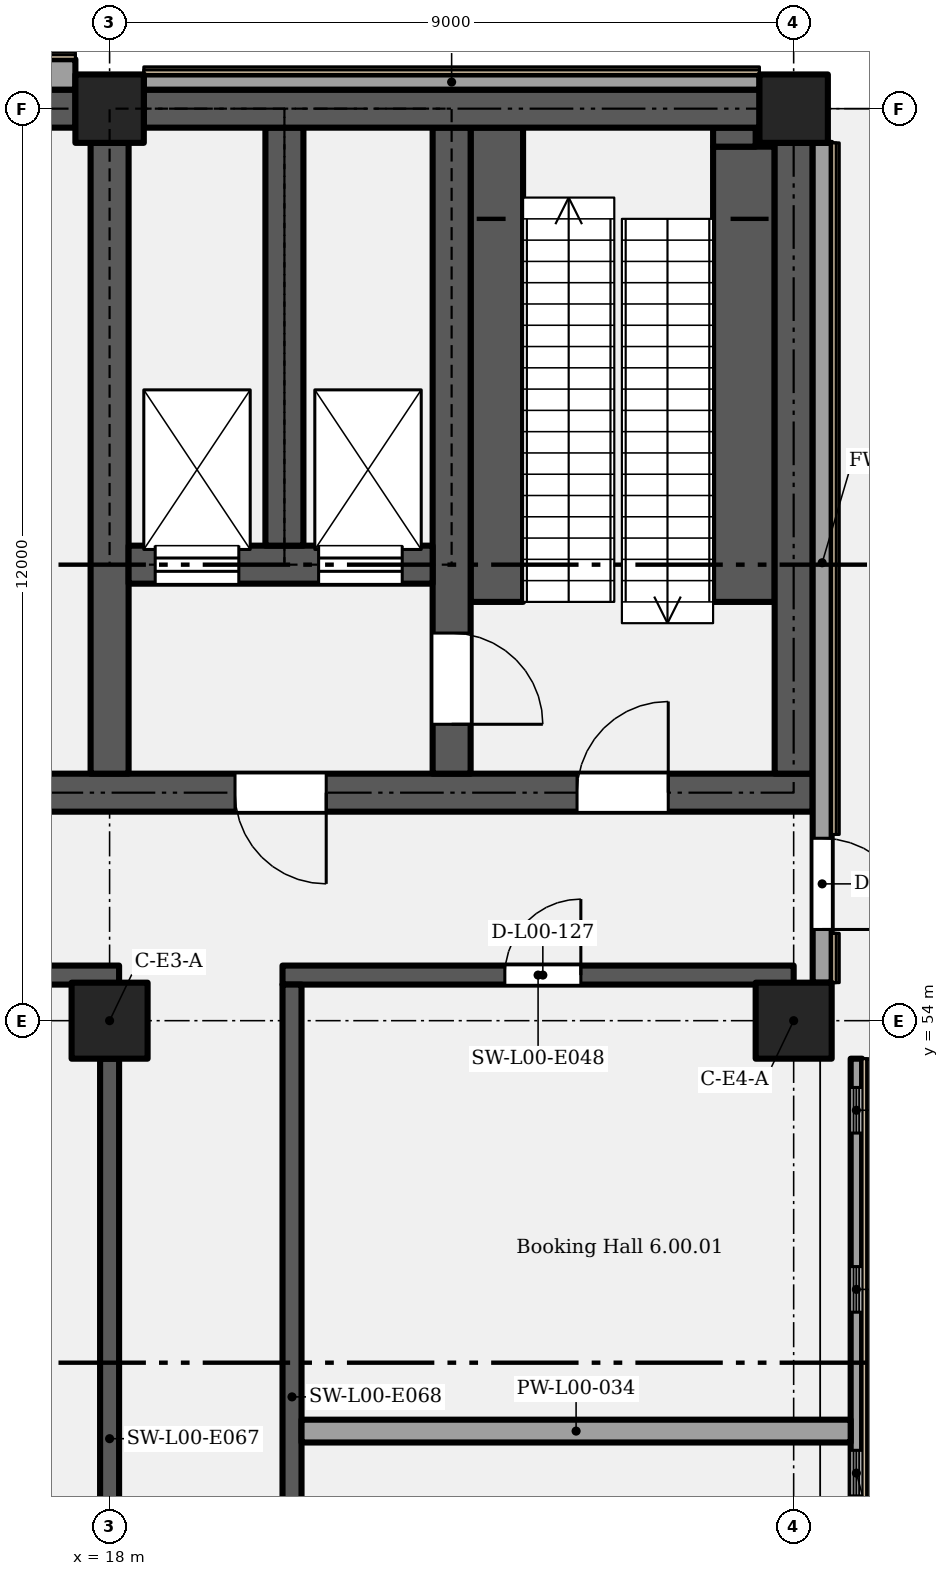
"""IFC4 building model, lengths in metres.
Left out: names, types, materials, properties, quantities, classifications, styles, units other than length and angle.
Written with IfcOpenShell. Run it as: python <this file> out.ifc"""

import sys

from ifc_helpers import new_model, si_unit, direction, frame, frame_2d, origin, origin_2d, place, context, subcontext, project, spatial, rectangle, extrude, element, fill, save


model = new_model("IFC4")
c1 = context("Model", 3, precision=1e-05, world=origin(), true_north=direction((0.0, 1.0)))
c2 = subcontext(c1, "Body", "Model", "MODEL_VIEW")
j1 = project(units=[si_unit("LENGTHUNIT", "METRE"), si_unit("PLANEANGLEUNIT", "RADIAN")], contexts=[c1])
p1 = place(None, origin())
s1 = spatial("IfcSite", under=j1, at=p1, CompositionType="ELEMENT")
p2 = place(p1, origin())
s2 = spatial("IfcBuilding", under=s1, at=p2, CompositionType="ELEMENT")
p3 = place(p2, origin())
s3 = spatial("IfcBuildingStorey", under=s2, at=p3, CompositionType="ELEMENT", Elevation=0.0)
for number, where, z_axis, x_axis in (
    (1, (18.0, 54.0, 0.0), (0.0, 0.0, 1.0), (1.0, 0.0, 0.0)),
    (2, (27.0, 54.0, 0.0), (0.0, 0.0, 1.0), (1.0, 0.0, 0.0)),
):
    element("IfcColumn", number, at=place(p3, frame(where, z_axis=z_axis, x_axis=x_axis)), inside=s3, PredefinedType="COLUMN", context=c2, shape_type="SweptSolid", body=[
        extrude(rectangle(XDim=1.0, YDim=1.0, at=origin_2d()), origin(), (0.0, 0.0, 1.0), 6.6),
    ])
for number, where, z_axis, x_axis in (
    (3, (18.0, 66.0, 0.0), (0.0, 0.0, 1.0), (1.0, 0.0, 0.0)),
    (4, (27.0, 66.0, 0.0), (0.0, 0.0, 1.0), (1.0, 0.0, 0.0)),
):
    element("IfcColumn", number, at=place(p3, frame(where, z_axis=z_axis, x_axis=x_axis)), inside=s3, PredefinedType="COLUMN", context=c2, shape_type="SweptSolid", body=[
        extrude(rectangle(XDim=0.9, YDim=0.9, at=origin_2d()), origin(), (0.0, 0.0, 1.0), 6.6),
    ])
p4 = place(p3, frame((-0.25, 57.0, 0.0), z_axis=(0.0, 0.0, 1.0), x_axis=(1.0, 0.0, 0.0)))
e5 = element("IfcWall", 5, at=p4, inside=s3, PredefinedType="SHEAR", context=c2, shape_type="SweptSolid", body=[
    extrude(rectangle(XDim=27.5, YDim=0.5, at=frame_2d((13.75, 0.0))), origin(), (0.0, 0.0, 1.0), 6.3),
])
p5 = place(p4, frame((1.9, 0.0, 0.0)))
e6 = element("IfcOpeningElement", 6, at=p5, cuts=e5, PredefinedType="OPENING", context=c2, shape_type="SweptSolid", body=[
    extrude(rectangle(XDim=1.2, YDim=2.1, at=frame_2d((0.6, 1.05))), frame((0.0, 0.26, 0.0), z_axis=(0.0, -1.0, 0.0), x_axis=(1.0, 0.0, 0.0)), (0.0, 0.0, 1.0), 0.52),
])
p6 = place(p4, frame((7.6, 0.0, 0.0), z_axis=(0.0, 0.0, 1.0), x_axis=(-1.0, 0.0, 0.0)))
e7 = element("IfcOpeningElement", 7, at=p6, cuts=e5, PredefinedType="OPENING", context=c2, shape_type="SweptSolid", body=[
    extrude(rectangle(XDim=1.2, YDim=2.1, at=frame_2d((0.6, 1.05))), frame((0.0, 0.26, 0.0), z_axis=(0.0, -1.0, 0.0), x_axis=(1.0, 0.0, 0.0)), (0.0, 0.0, 1.0), 0.52),
])
p7 = place(p4, frame((21.1, 0.0, 0.0), z_axis=(0.0, 0.0, 1.0), x_axis=(-1.0, 0.0, 0.0)))
e8 = element("IfcOpeningElement", 8, at=p7, cuts=e5, PredefinedType="OPENING", context=c2, shape_type="SweptSolid", body=[
    extrude(rectangle(XDim=1.2, YDim=2.1, at=frame_2d((0.6, 1.05))), frame((0.0, 0.26, 0.0), z_axis=(0.0, -1.0, 0.0), x_axis=(1.0, 0.0, 0.0)), (0.0, 0.0, 1.0), 0.52),
])
p8 = place(p4, frame((24.4, 0.0, 0.0)))
e9 = element("IfcOpeningElement", 9, at=p8, cuts=e5, PredefinedType="OPENING", context=c2, shape_type="SweptSolid", body=[
    extrude(rectangle(XDim=1.2, YDim=2.1, at=frame_2d((0.6, 1.05))), frame((0.0, 0.26, 0.0), z_axis=(0.0, -1.0, 0.0), x_axis=(1.0, 0.0, 0.0)), (0.0, 0.0, 1.0), 0.52),
])
p9 = place(p3, frame((18.0, 57.25, 0.0), z_axis=(0.0, 0.0, 1.0), x_axis=(0.0, 1.0, 0.0)))
e10 = element("IfcWall", 10, at=p9, inside=s3, PredefinedType="SHEAR", context=c2, shape_type="SweptSolid", body=[
    extrude(rectangle(XDim=8.3, YDim=0.5, at=frame_2d((4.15, 0.0))), origin(), (0.0, 0.0, 1.0), 6.3),
])
p10 = place(p3, frame((22.5, 57.25, 0.0), z_axis=(0.0, 0.0, 1.0), x_axis=(0.0, 1.0, 0.0)))
e11 = element("IfcWall", 11, at=p10, inside=s3, PredefinedType="SHEAR", context=c2, shape_type="SweptSolid", body=[
    extrude(rectangle(XDim=8.5, YDim=0.5, at=frame_2d((4.25, 0.0))), origin(), (0.0, 0.0, 1.0), 6.3),
])
p11 = place(p10, frame((1.85, 0.0, 0.0), z_axis=(0.0, 0.0, 1.0), x_axis=(-1.0, 0.0, 0.0)))
e12 = element("IfcOpeningElement", 12, at=p11, cuts=e11, PredefinedType="OPENING", context=c2, shape_type="SweptSolid", body=[
    extrude(rectangle(XDim=1.2, YDim=2.1, at=frame_2d((0.6, 1.05))), frame((0.0, 0.26, 0.0), z_axis=(0.0, -1.0, 0.0), x_axis=(1.0, 0.0, 0.0)), (0.0, 0.0, 1.0), 0.52),
])
p12 = place(p3, frame((27.0, 57.25, 0.0), z_axis=(0.0, 0.0, 1.0), x_axis=(0.0, 1.0, 0.0)))
e13 = element("IfcWall", 13, at=p12, inside=s3, PredefinedType="SHEAR", context=c2, shape_type="SweptSolid", body=[
    extrude(rectangle(XDim=8.3, YDim=0.5, at=frame_2d((4.15, 0.0))), origin(), (0.0, 0.0, 1.0), 6.3),
])
p13 = place(p3, frame((18.25, 60.0, 0.0), z_axis=(0.0, 0.0, 1.0), x_axis=(1.0, 0.0, 0.0)))
e14 = element("IfcWall", 14, at=p13, inside=s3, PredefinedType="SHEAR", context=c2, shape_type="SweptSolid", body=[
    extrude(rectangle(XDim=4.0, YDim=0.5, at=frame_2d((2.0, 0.0))), origin(), (0.0, 0.0, 1.0), 6.3),
])
p14 = place(p13, frame((0.35, 0.0, 0.0)))
e15 = element("IfcOpeningElement", 15, at=p14, cuts=e14, PredefinedType="OPENING", context=c2, shape_type="SweptSolid", body=[
    extrude(rectangle(XDim=1.1, YDim=2.1, at=frame_2d((0.55, 1.05))), frame((0.0, 0.26, 0.0), z_axis=(0.0, -1.0, 0.0), x_axis=(1.0, 0.0, 0.0)), (0.0, 0.0, 1.0), 0.52),
])
p15 = place(p13, frame((2.5, 0.0, 0.0)))
e16 = element("IfcOpeningElement", 16, at=p15, cuts=e14, PredefinedType="OPENING", context=c2, shape_type="SweptSolid", body=[
    extrude(rectangle(XDim=1.1, YDim=2.1, at=frame_2d((0.55, 1.05))), frame((0.0, 0.26, 0.0), z_axis=(0.0, -1.0, 0.0), x_axis=(1.0, 0.0, 0.0)), (0.0, 0.0, 1.0), 0.52),
])
p16 = place(p3, frame((20.3, 60.25, 0.0), z_axis=(0.0, 0.0, 1.0), x_axis=(0.0, 1.0, 0.0)))
e17 = element("IfcWall", 17, at=p16, inside=s3, PredefinedType="SHEAR", context=c2, shape_type="SweptSolid", body=[
    extrude(rectangle(XDim=5.5, YDim=0.5, at=frame_2d((2.75, 0.0))), origin(), (0.0, 0.0, 1.0), 6.3),
])
p17 = place(p3, frame((9.45, 66.0, 0.0), z_axis=(0.0, 0.0, 1.0), x_axis=(1.0, 0.0, 0.0)))
e18 = element("IfcWall", 18, at=p17, inside=s3, PredefinedType="SHEAR", context=c2, shape_type="SweptSolid", body=[
    extrude(rectangle(XDim=8.1, YDim=0.5, at=frame_2d((4.05, 0.0))), origin(), (0.0, 0.0, 1.0), 6.3),
])
p18 = place(p17, frame((3.35, 0.0, 0.0)))
e19 = element("IfcOpeningElement", 19, at=p18, cuts=e18, PredefinedType="OPENING", context=c2, shape_type="SweptSolid", body=[
    extrude(rectangle(XDim=1.4, YDim=2.1, at=frame_2d((0.7, 1.05))), frame((0.0, 0.26, 0.0), z_axis=(0.0, -1.0, 0.0), x_axis=(1.0, 0.0, 0.0)), (0.0, 0.0, 1.0), 0.52),
])
p19 = place(p3, frame((18.45, 66.0, 0.0), z_axis=(0.0, 0.0, 1.0), x_axis=(1.0, 0.0, 0.0)))
e20 = element("IfcWall", 20, at=p19, inside=s3, PredefinedType="SHEAR", context=c2, shape_type="SweptSolid", body=[
    extrude(rectangle(XDim=8.1, YDim=0.5, at=frame_2d((4.05, 0.0))), origin(), (0.0, 0.0, 1.0), 6.3),
])
p20 = place(p3, frame((14.2, 66.45, 0.0), z_axis=(0.0, 0.0, 1.0), x_axis=(1.0, 0.0, 0.0)))
e21 = element("IfcWall", 21, at=p20, inside=s3, PredefinedType="SOLIDWALL", context=c2, shape_type="SweptSolid", body=[
    extrude(rectangle(XDim=3.35, YDim=0.4, at=frame_2d((1.675, 0.0))), origin(), (0.0, 0.0, 1.0), 6.3),
])
p21 = place(p3, frame((18.45, 66.35, 0.0), z_axis=(0.0, 0.0, 1.0), x_axis=(1.0, 0.0, 0.0)))
e22 = element("IfcWall", 22, at=p21, inside=s3, PredefinedType="SOLIDWALL", context=c2, shape_type="SweptSolid", body=[
    extrude(rectangle(XDim=8.1, YDim=0.2, at=frame_2d((4.05, 0.0))), origin(), (0.0, 0.0, 1.0), 6.3),
])
p22 = place(p3, frame((27.825, 38.0, 0.0), z_axis=(0.0, 0.0, 1.0), x_axis=(0.0, 1.0, 0.0)))
e23 = element("IfcWall", 23, at=p22, inside=s3, PredefinedType="SOLIDWALL", context=c2, shape_type="SweptSolid", body=[
    extrude(rectangle(XDim=15.5, YDim=0.15, at=frame_2d((7.75, 0.0))), origin(), (0.0, 0.0, 1.0), 6.4),
])
p23 = place(p22, frame((0.379, 0.0, 1.5)))
e24 = element("IfcOpeningElement", 24, at=p23, cuts=e23, PredefinedType="OPENING", context=c2, shape_type="SweptSolid", body=[
    extrude(rectangle(XDim=0.6, YDim=3.0, at=frame_2d((0.3, 1.5))), frame((0.0, 0.085, 0.0), z_axis=(0.0, -1.0, 0.0), x_axis=(1.0, 0.0, 0.0)), (0.0, 0.0, 1.0), 0.17),
])
p24 = place(p22, frame((2.736, 0.0, 1.5)))
e25 = element("IfcOpeningElement", 25, at=p24, cuts=e23, PredefinedType="OPENING", context=c2, shape_type="SweptSolid", body=[
    extrude(rectangle(XDim=0.6, YDim=3.0, at=frame_2d((0.3, 1.5))), frame((0.0, 0.085, 0.0), z_axis=(0.0, -1.0, 0.0), x_axis=(1.0, 0.0, 0.0)), (0.0, 0.0, 1.0), 0.17),
])
p25 = place(p22, frame((7.45, 0.0, 1.5)))
e26 = element("IfcOpeningElement", 26, at=p25, cuts=e23, PredefinedType="OPENING", context=c2, shape_type="SweptSolid", body=[
    extrude(rectangle(XDim=0.6, YDim=3.0, at=frame_2d((0.3, 1.5))), frame((0.0, 0.085, 0.0), z_axis=(0.0, -1.0, 0.0), x_axis=(1.0, 0.0, 0.0)), (0.0, 0.0, 1.0), 0.17),
])
p26 = place(p22, frame((9.747, 0.0, 1.5)))
e27 = element("IfcOpeningElement", 27, at=p26, cuts=e23, PredefinedType="OPENING", context=c2, shape_type="SweptSolid", body=[
    extrude(rectangle(XDim=0.6, YDim=3.0, at=frame_2d((0.3, 1.5))), frame((0.0, 0.085, 0.0), z_axis=(0.0, -1.0, 0.0), x_axis=(1.0, 0.0, 0.0)), (0.0, 0.0, 1.0), 0.17),
])
p27 = place(p22, frame((12.164, 0.0, 1.5)))
e28 = element("IfcOpeningElement", 28, at=p27, cuts=e23, PredefinedType="OPENING", context=c2, shape_type="SweptSolid", body=[
    extrude(rectangle(XDim=0.6, YDim=3.0, at=frame_2d((0.3, 1.5))), frame((0.0, 0.085, 0.0), z_axis=(0.0, -1.0, 0.0), x_axis=(1.0, 0.0, 0.0)), (0.0, 0.0, 1.0), 0.17),
])
p28 = place(p22, frame((14.521, 0.0, 1.5)))
e29 = element("IfcOpeningElement", 29, at=p28, cuts=e23, PredefinedType="OPENING", context=c2, shape_type="SweptSolid", body=[
    extrude(rectangle(XDim=0.6, YDim=3.0, at=frame_2d((0.3, 1.5))), frame((0.0, 0.085, 0.0), z_axis=(0.0, -1.0, 0.0), x_axis=(1.0, 0.0, 0.0)), (0.0, 0.0, 1.0), 0.17),
])
p29 = place(p3, frame((27.375, 54.5, 0.0), z_axis=(0.0, 0.0, 1.0), x_axis=(0.0, 1.0, 0.0)))
e30 = element("IfcWall", 30, at=p29, inside=s3, PredefinedType="SOLIDWALL", context=c2, shape_type="SweptSolid", body=[
    extrude(rectangle(XDim=11.05, YDim=0.25, at=frame_2d((5.525, 0.0))), origin(), (0.0, 0.0, 1.0), 6.3),
])
p30 = place(p29, frame((1.9, 0.0, 0.0), z_axis=(0.0, 0.0, 1.0), x_axis=(-1.0, 0.0, 0.0)))
e31 = element("IfcOpeningElement", 31, at=p30, cuts=e30, PredefinedType="OPENING", context=c2, shape_type="SweptSolid", body=[
    extrude(rectangle(XDim=1.2, YDim=2.1, at=frame_2d((0.6, 1.05))), frame((0.0, 0.135, 0.0), z_axis=(0.0, -1.0, 0.0), x_axis=(1.0, 0.0, 0.0)), (0.0, 0.0, 1.0), 0.27),
])
p31 = place(p3, frame((20.525, 48.6, 0.0), z_axis=(0.0, 0.0, 1.0), x_axis=(1.0, 0.0, 0.0)))
e32 = element("IfcWall", 32, at=p31, inside=s3, PredefinedType="PARTITIONING", context=c2, shape_type="SweptSolid", body=[
    extrude(rectangle(XDim=7.225, YDim=0.3, at=frame_2d((3.613, 0.0))), origin(), (0.0, 0.0, 1.0), 6.3),
])
p32 = place(p3, frame((9.0, 54.6, 0.0), z_axis=(0.0, 0.0, 1.0), x_axis=(1.0, 0.0, 0.0)))
e33 = element("IfcWall", 33, at=p32, inside=s3, PredefinedType="SHEAR", context=c2, shape_type="SweptSolid", body=[
    extrude(rectangle(XDim=9.125, YDim=0.25, at=frame_2d((4.562, 0.0))), origin(), (0.0, 0.0, 1.0), 6.3),
])
p33 = place(p32, frame((3.9, 0.0, 0.0)))
e34 = element("IfcOpeningElement", 34, at=p33, cuts=e33, PredefinedType="OPENING", context=c2, shape_type="SweptSolid", body=[
    extrude(rectangle(XDim=1.2, YDim=2.1, at=frame_2d((0.6, 1.05))), frame((0.0, 0.135, 0.0), z_axis=(0.0, -1.0, 0.0), x_axis=(1.0, 0.0, 0.0)), (0.0, 0.0, 1.0), 0.27),
])
p34 = place(p3, frame((20.275, 54.6, 0.0), z_axis=(0.0, 0.0, 1.0), x_axis=(1.0, 0.0, 0.0)))
e35 = element("IfcWall", 35, at=p34, inside=s3, PredefinedType="SHEAR", context=c2, shape_type="SweptSolid", body=[
    extrude(rectangle(XDim=6.725, YDim=0.25, at=frame_2d((3.363, 0.0))), origin(), (0.0, 0.0, 1.0), 6.3),
])
p35 = place(p34, frame((2.925, 0.0, 0.0)))
e36 = element("IfcOpeningElement", 36, at=p35, cuts=e35, PredefinedType="OPENING", context=c2, shape_type="SweptSolid", body=[
    extrude(rectangle(XDim=1.0, YDim=2.1, at=frame_2d((0.5, 1.05))), frame((0.0, 0.135, 0.0), z_axis=(0.0, -1.0, 0.0), x_axis=(1.0, 0.0, 0.0)), (0.0, 0.0, 1.0), 0.27),
])
p36 = place(p3, frame((18.0, 43.5, 0.0), z_axis=(0.0, 0.0, 1.0), x_axis=(0.0, 1.0, 0.0)))
e37 = element("IfcWall", 37, at=p36, inside=s3, PredefinedType="SHEAR", context=c2, shape_type="SweptSolid", body=[
    extrude(rectangle(XDim=10.0, YDim=0.25, at=frame_2d((5.0, 0.0))), origin(), (0.0, 0.0, 1.0), 6.3),
])
p37 = place(p3, frame((20.4, 43.625, 0.0), z_axis=(0.0, 0.0, 1.0), x_axis=(0.0, 1.0, 0.0)))
e38 = element("IfcWall", 38, at=p37, inside=s3, PredefinedType="SHEAR", context=c2, shape_type="SweptSolid", body=[
    extrude(rectangle(XDim=10.85, YDim=0.25, at=frame_2d((5.425, 0.0))), origin(), (0.0, 0.0, 1.0), 6.3),
])
p38 = place(p37, frame((1.375, 0.0, 0.0)))
e39 = element("IfcOpeningElement", 39, at=p38, cuts=e38, PredefinedType="OPENING", context=c2, shape_type="SweptSolid", body=[
    extrude(rectangle(XDim=1.0, YDim=2.1, at=frame_2d((0.5, 1.05))), frame((0.0, 0.135, 0.0), z_axis=(0.0, -1.0, 0.0), x_axis=(1.0, 0.0, 0.0)), (0.0, 0.0, 1.0), 0.27),
])
p39 = place(p3, frame((23.095, 59.51, 0.0), z_axis=(0.0, 0.0, 1.0), x_axis=(0.0, 1.0, 0.0)))
e40 = element("IfcWall", 40, at=p39, inside=s3, PredefinedType="SHEAR", context=c2, shape_type="SweptSolid", body=[
    extrude(rectangle(XDim=6.24, YDim=0.69, at=frame_2d((3.12, 0.0))), origin(), (0.0, 0.0, 1.0), 3.1),
])
p40 = place(p3, frame((26.345, 59.51, 0.0), z_axis=(0.0, 0.0, 1.0), x_axis=(0.0, 1.0, 0.0)))
e41 = element("IfcWall", 41, at=p40, inside=s3, PredefinedType="SHEAR", context=c2, shape_type="SweptSolid", body=[
    extrude(rectangle(XDim=5.99, YDim=0.81, at=frame_2d((2.995, 0.0))), origin(), (0.0, 0.0, 1.0), 3.1),
])
p41 = place(p3, frame((26.22, 65.5, 0.0), z_axis=(0.0, 0.0, 1.0), x_axis=(0.0, 1.0, 0.0)))
e42 = element("IfcWall", 42, at=p41, inside=s3, PredefinedType="SHEAR", context=c2, shape_type="SweptSolid", body=[
    extrude(rectangle(XDim=0.25, YDim=0.56, at=frame_2d((0.125, 0.0))), origin(), (0.0, 0.0, 1.0), 3.1),
])
p42 = place(p26, origin())
e43 = element("IfcWindow", 43, at=p42, inside=s3, PartitioningType="SINGLE_PANEL", PredefinedType="WINDOW", context=c2, shape_type="SweptSolid", body=[
    extrude(rectangle(XDim=0.6, YDim=3.0, at=frame_2d((0.3, 1.5))), frame((0.0, 0.03, 0.0), z_axis=(0.0, -1.0, 0.0), x_axis=(1.0, 0.0, 0.0)), (0.0, 0.0, 1.0), 0.06),
])
fill(e27, e43)
p43 = place(p27, origin())
e44 = element("IfcWindow", 44, at=p43, inside=s3, PartitioningType="SINGLE_PANEL", PredefinedType="WINDOW", context=c2, shape_type="SweptSolid", body=[
    extrude(rectangle(XDim=0.6, YDim=3.0, at=frame_2d((0.3, 1.5))), frame((0.0, 0.03, 0.0), z_axis=(0.0, -1.0, 0.0), x_axis=(1.0, 0.0, 0.0)), (0.0, 0.0, 1.0), 0.06),
])
fill(e28, e44)
p44 = place(p28, origin())
e45 = element("IfcWindow", 45, at=p44, inside=s3, PartitioningType="SINGLE_PANEL", PredefinedType="WINDOW", context=c2, shape_type="SweptSolid", body=[
    extrude(rectangle(XDim=0.6, YDim=3.0, at=frame_2d((0.3, 1.5))), frame((0.0, 0.03, 0.0), z_axis=(0.0, -1.0, 0.0), x_axis=(1.0, 0.0, 0.0)), (0.0, 0.0, 1.0), 0.06),
])
fill(e29, e45)
p45 = place(p30, origin())
e46 = element("IfcDoor", 46, at=p45, inside=s3, OperationType="SINGLE_SWING_LEFT", PredefinedType="DOOR", context=c2, shape_type="SweptSolid", body=[
    extrude(rectangle(XDim=1.2, YDim=2.1, at=frame_2d((0.6, 1.05))), frame((0.0, 0.025, 0.0), z_axis=(0.0, -1.0, 0.0), x_axis=(1.0, 0.0, 0.0)), (0.0, 0.0, 1.0), 0.05),
])
fill(e31, e46)
p46 = place(p7, origin())
e47 = element("IfcDoor", 47, at=p46, inside=s3, OperationType="SINGLE_SWING_LEFT", PredefinedType="DOOR", context=c2, shape_type="SweptSolid", body=[
    extrude(rectangle(XDim=1.2, YDim=2.1, at=frame_2d((0.6, 1.05))), frame((0.0, 0.025, 0.0), z_axis=(0.0, -1.0, 0.0), x_axis=(1.0, 0.0, 0.0)), (0.0, 0.0, 1.0), 0.05),
])
fill(e8, e47)
p47 = place(p14, origin())
e48 = element("IfcDoor", 48, at=p47, inside=s3, OperationType="SLIDING_TO_LEFT", PredefinedType="DOOR", context=c2, shape_type="SweptSolid", body=[
    extrude(rectangle(XDim=1.1, YDim=2.1, at=frame_2d((0.55, 1.05))), frame((0.0, 0.025, 0.0), z_axis=(0.0, -1.0, 0.0), x_axis=(1.0, 0.0, 0.0)), (0.0, 0.0, 1.0), 0.05),
])
fill(e15, e48)
p48 = place(p15, origin())
e49 = element("IfcDoor", 49, at=p48, inside=s3, OperationType="SLIDING_TO_LEFT", PredefinedType="DOOR", context=c2, shape_type="SweptSolid", body=[
    extrude(rectangle(XDim=1.1, YDim=2.1, at=frame_2d((0.55, 1.05))), frame((0.0, 0.025, 0.0), z_axis=(0.0, -1.0, 0.0), x_axis=(1.0, 0.0, 0.0)), (0.0, 0.0, 1.0), 0.05),
])
fill(e16, e49)
p49 = place(p11, origin())
e50 = element("IfcDoor", 50, at=p49, inside=s3, OperationType="SINGLE_SWING_RIGHT", PredefinedType="DOOR", context=c2, shape_type="SweptSolid", body=[
    extrude(rectangle(XDim=1.2, YDim=2.1, at=frame_2d((0.6, 1.05))), frame((0.0, 0.025, 0.0), z_axis=(0.0, -1.0, 0.0), x_axis=(1.0, 0.0, 0.0)), (0.0, 0.0, 1.0), 0.05),
])
fill(e12, e50)
p50 = place(p8, origin())
e51 = element("IfcDoor", 51, at=p50, inside=s3, OperationType="SINGLE_SWING_RIGHT", PredefinedType="DOOR", context=c2, shape_type="SweptSolid", body=[
    extrude(rectangle(XDim=1.2, YDim=2.1, at=frame_2d((0.6, 1.05))), frame((0.0, 0.025, 0.0), z_axis=(0.0, -1.0, 0.0), x_axis=(1.0, 0.0, 0.0)), (0.0, 0.0, 1.0), 0.05),
])
fill(e9, e51)
p51 = place(p35, origin())
e52 = element("IfcDoor", 52, at=p51, inside=s3, OperationType="SINGLE_SWING_RIGHT", PredefinedType="DOOR", context=c2, shape_type="SweptSolid", body=[
    extrude(rectangle(XDim=1.0, YDim=2.1, at=frame_2d((0.5, 1.05))), frame((0.0, 0.025, 0.0), z_axis=(0.0, -1.0, 0.0), x_axis=(1.0, 0.0, 0.0)), (0.0, 0.0, 1.0), 0.05),
])
fill(e36, e52)
save(model, sys.argv[1])
